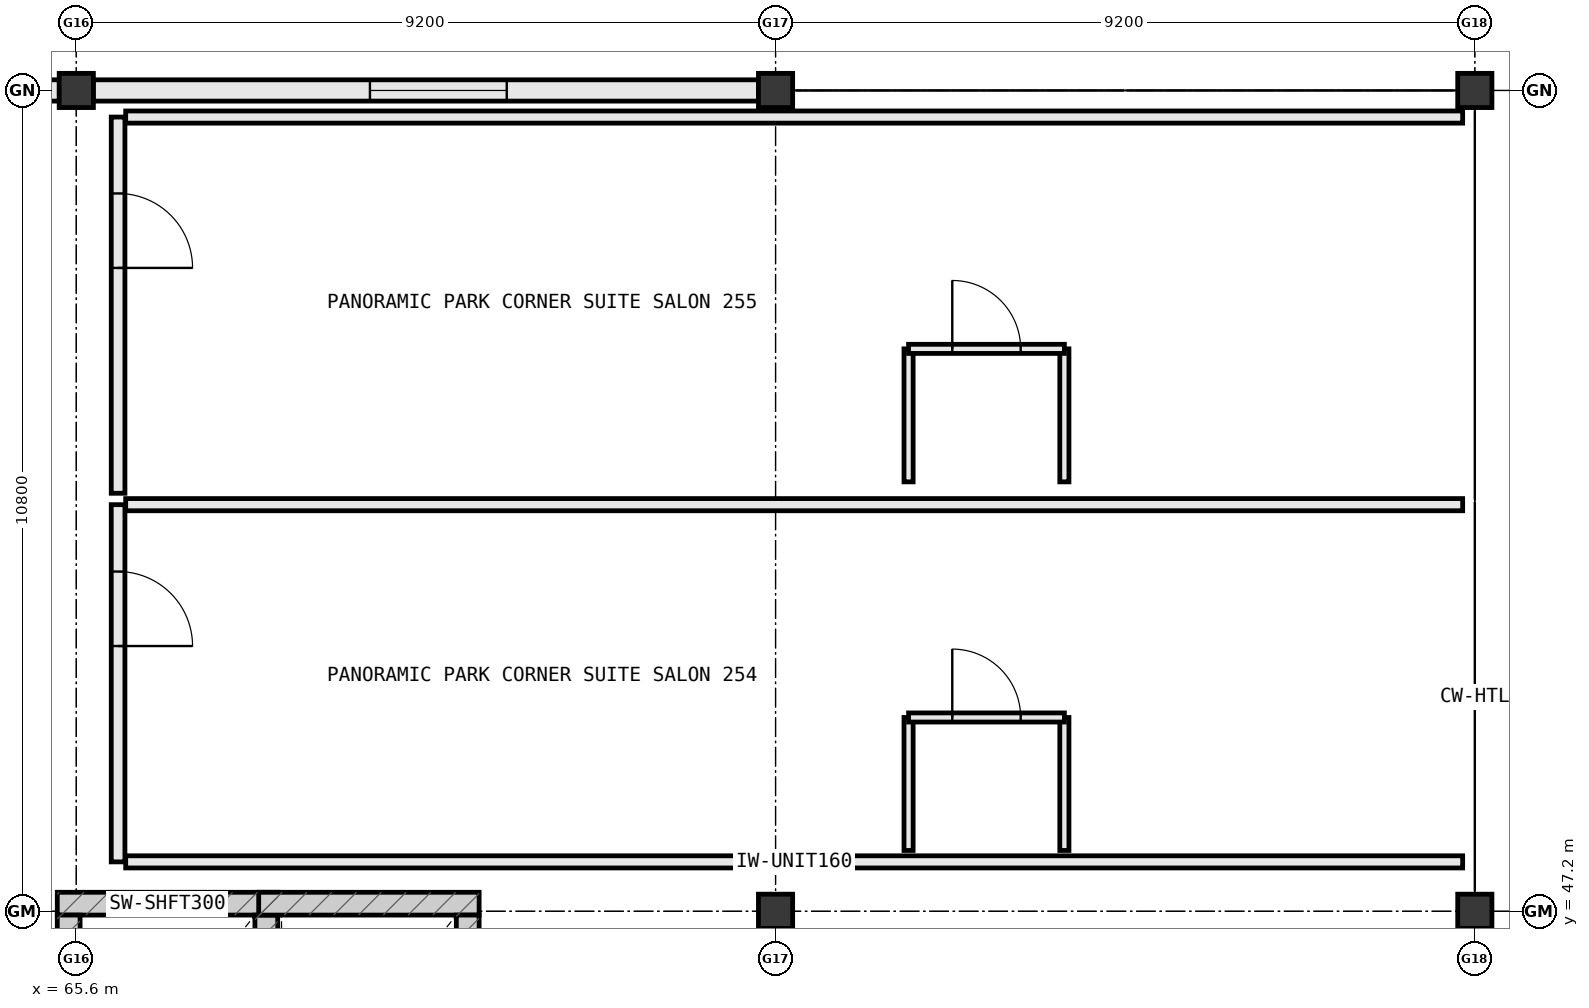
"""IFC4 building model, lengths in metres.
Left out: names, types, materials, properties, quantities, classifications, styles, units other than length and angle.
Written with IfcOpenShell. Run it as: python <this file> out.ifc"""

import sys

from ifc_helpers import new_model, si_unit, direction, frame, frame_2d, origin, origin_2d, place, context, subcontext, project, spatial, rectangle, extrude, element, fill, save


model = new_model("IFC4")
c1 = context("Model", 3, precision=1e-05, world=origin(), true_north=direction((0.0, 1.0)))
c2 = subcontext(c1, "Body", "Model", "MODEL_VIEW")
j1 = project(units=[si_unit("LENGTHUNIT", "METRE"), si_unit("PLANEANGLEUNIT", "RADIAN")], contexts=[c1])
p1 = place(None, origin())
s1 = spatial("IfcSite", under=j1, at=p1, CompositionType="ELEMENT")
p2 = place(p1, origin())
s2 = spatial("IfcBuilding", under=s1, at=p2, CompositionType="ELEMENT")
p3 = place(p2, frame((0.0, 0.0, 35.2)))
s3 = spatial("IfcBuildingStorey", under=s2, at=p3, CompositionType="ELEMENT", Elevation=35.2)
for number, where, z_axis, x_axis in (
    (1, (74.8, 47.2, 0.0), (0.0, 0.0, 1.0), (1.0, 0.0, 0.0)),
    (2, (74.8, 58.0, 0.0), (0.0, 0.0, 1.0), (1.0, 0.0, 0.0)),
    (3, (84.0, 47.2, 0.0), (0.0, 0.0, 1.0), (1.0, 0.0, 0.0)),
    (4, (84.0, 58.0, 0.0), (0.0, 0.0, 1.0), (1.0, 0.0, 0.0)),
    (5, (65.6, 58.0, 0.0), (0.0, 0.0, 1.0), (1.0, 0.0, 0.0)),
):
    element("IfcColumn", number, at=place(p3, frame(where, z_axis=z_axis, x_axis=x_axis)), inside=s3, PredefinedType="COLUMN", context=c2, shape_type="SweptSolid", body=[
        extrude(rectangle(XDim=0.45, YDim=0.45, at=origin_2d()), origin(), (0.0, 0.0, 1.0), 3.8),
    ])
p4 = place(p3, frame((74.577, 58.0, 0.0), z_axis=(0.0, 0.0, 1.0), x_axis=(-1.0, 0.0, 0.0)))
e6 = element("IfcWall", 6, at=p4, inside=s3, PredefinedType="STANDARD", context=c2, shape_type="SweptSolid", body=[
    extrude(rectangle(XDim=8.754, YDim=0.28, at=frame_2d((4.377, 0.0))), origin(), (0.0, 0.0, 1.0), 2.88),
])
p5 = place(p4, frame((3.313, 0.0, 0.85)))
e7 = element("IfcOpeningElement", 7, at=p5, cuts=e6, PredefinedType="OPENING", context=c2, shape_type="SweptSolid", body=[
    extrude(rectangle(XDim=1.8, YDim=1.85, at=frame_2d((0.9, 0.925))), frame((0.0, 0.152, 0.0), z_axis=(0.0, -1.0, 0.0), x_axis=(1.0, 0.0, 0.0)), (0.0, 0.0, 1.0), 0.304),
])
p6 = place(p3, frame((65.377, 58.0, 0.0), z_axis=(0.0, 0.0, 1.0), x_axis=(-1.0, 0.0, 0.0)))
e8 = element("IfcWall", 8, at=p6, inside=s3, PredefinedType="STANDARD", context=c2, shape_type="SweptSolid", body=[
    extrude(rectangle(XDim=4.354, YDim=0.28, at=frame_2d((2.177, 0.0))), origin(), (0.0, 0.0, 1.0), 2.88),
])
p7 = place(p6, frame((1.427, 0.0, 0.85)))
e9 = element("IfcOpeningElement", 9, at=p7, cuts=e8, PredefinedType="OPENING", context=c2, shape_type="SweptSolid", body=[
    extrude(rectangle(XDim=1.5, YDim=1.75, at=frame_2d((0.75, 0.875))), frame((0.0, 0.152, 0.0), z_axis=(0.0, -1.0, 0.0), x_axis=(1.0, 0.0, 0.0)), (0.0, 0.0, 1.0), 0.304),
])
for number, where, z_axis, x_axis in (
    (10, (68.25, 47.3, 0.0), (0.0, 0.0, 1.0), (-1.0, 0.0, 0.0)),
    (11, (68.1, 44.25, 0.0), (0.0, 0.0, 1.0), (0.0, 1.0, 0.0)),
    (12, (65.5, 47.15, 0.0), (0.0, 0.0, 1.0), (0.0, -1.0, 0.0)),
    (13, (70.9, 47.3, 0.0), (0.0, 0.0, 1.0), (-1.0, 0.0, 0.0)),
    (14, (70.75, 44.25, 0.0), (0.0, 0.0, 1.0), (0.0, 1.0, 0.0)),
):
    element("IfcWall", number, at=place(p3, frame(where, z_axis=z_axis, x_axis=x_axis)), inside=s3, PredefinedType="SHEAR", context=c2, shape_type="SweptSolid", body=[
        extrude(rectangle(XDim=2.9, YDim=0.3, at=frame_2d((1.45, 0.0))), origin(), (0.0, 0.0, 1.0), 3.8),
    ])
p8 = place(p3, frame((66.15, 52.55, 0.0), z_axis=(0.0, 0.0, 1.0), x_axis=(0.0, -1.0, 0.0)))
e15 = element("IfcWall", 15, at=p8, inside=s3, PredefinedType="PARTITIONING", context=c2, shape_type="SweptSolid", body=[
    extrude(rectangle(XDim=4.7, YDim=0.18, at=frame_2d((2.35, 0.0))), origin(), (0.0, 0.0, 1.0), 3.565),
])
p9 = place(p8, frame((0.88, 0.0, 0.0)))
e16 = element("IfcOpeningElement", 16, at=p9, cuts=e15, PredefinedType="OPENING", context=c2, shape_type="SweptSolid", body=[
    extrude(rectangle(XDim=0.98, YDim=2.18, at=frame_2d((0.49, 1.09))), frame((0.0, 0.102, 0.0), z_axis=(0.0, -1.0, 0.0), x_axis=(1.0, 0.0, 0.0)), (0.0, 0.0, 1.0), 0.204),
])
for number, where, z_axis, x_axis in (
    (17, (66.25, 47.85, 0.0), (0.0, 0.0, 1.0), (1.0, 0.0, 0.0)),
    (18, (66.25, 52.55, 0.0), (0.0, 0.0, 1.0), (1.0, 0.0, 0.0)),
):
    element("IfcWall", number, at=place(p3, frame(where, z_axis=z_axis, x_axis=x_axis)), inside=s3, PredefinedType="PARTITIONING", context=c2, shape_type="SweptSolid", body=[
        extrude(rectangle(XDim=17.59, YDim=0.16, at=frame_2d((8.795, 0.0))), origin(), (0.0, 0.0, 1.0), 3.565),
    ])
for number, where, z_axis, x_axis in (
    (19, (76.55, 48.0, 0.0), (0.0, 0.0, 1.0), (0.0, 1.0, 0.0)),
    (20, (78.6, 48.0, 0.0), (0.0, 0.0, 1.0), (0.0, 1.0, 0.0)),
):
    element("IfcWall", number, at=place(p3, frame(where, z_axis=z_axis, x_axis=x_axis)), inside=s3, PredefinedType="PARTITIONING", context=c2, shape_type="SweptSolid", body=[
        extrude(rectangle(XDim=1.75, YDim=0.12, at=frame_2d((0.875, 0.0))), origin(), (0.0, 0.0, 1.0), 3.565),
    ])
p10 = place(p3, frame((76.55, 49.75, 0.0), z_axis=(0.0, 0.0, 1.0), x_axis=(1.0, 0.0, 0.0)))
e21 = element("IfcWall", 21, at=p10, inside=s3, PredefinedType="PARTITIONING", context=c2, shape_type="SweptSolid", body=[
    extrude(rectangle(XDim=2.05, YDim=0.12, at=frame_2d((1.025, 0.0))), origin(), (0.0, 0.0, 1.0), 3.565),
])
p11 = place(p10, frame((0.575, 0.0, 0.0)))
e22 = element("IfcOpeningElement", 22, at=p11, cuts=e21, PredefinedType="OPENING", context=c2, shape_type="SweptSolid", body=[
    extrude(rectangle(XDim=0.9, YDim=2.15, at=frame_2d((0.45, 1.075))), frame((0.0, 0.072, 0.0), z_axis=(0.0, -1.0, 0.0), x_axis=(1.0, 0.0, 0.0)), (0.0, 0.0, 1.0), 0.144),
])
p12 = place(p3, frame((66.15, 57.65, 0.0), z_axis=(0.0, 0.0, 1.0), x_axis=(0.0, -1.0, 0.0)))
e23 = element("IfcWall", 23, at=p12, inside=s3, PredefinedType="PARTITIONING", context=c2, shape_type="SweptSolid", body=[
    extrude(rectangle(XDim=4.95, YDim=0.18, at=frame_2d((2.475, 0.0))), origin(), (0.0, 0.0, 1.0), 3.565),
])
p13 = place(p12, frame((1.005, 0.0, 0.0)))
e24 = element("IfcOpeningElement", 24, at=p13, cuts=e23, PredefinedType="OPENING", context=c2, shape_type="SweptSolid", body=[
    extrude(rectangle(XDim=0.98, YDim=2.18, at=frame_2d((0.49, 1.09))), frame((0.0, 0.102, 0.0), z_axis=(0.0, -1.0, 0.0), x_axis=(1.0, 0.0, 0.0)), (0.0, 0.0, 1.0), 0.204),
])
p14 = place(p3, frame((66.25, 57.65, 0.0), z_axis=(0.0, 0.0, 1.0), x_axis=(1.0, 0.0, 0.0)))
e25 = element("IfcWall", 25, at=p14, inside=s3, PredefinedType="PARTITIONING", context=c2, shape_type="SweptSolid", body=[
    extrude(rectangle(XDim=17.59, YDim=0.16, at=frame_2d((8.795, 0.0))), origin(), (0.0, 0.0, 1.0), 2.88),
])
for number, where, z_axis, x_axis in (
    (26, (76.55, 52.85, 0.0), (0.0, 0.0, 1.0), (0.0, 1.0, 0.0)),
    (27, (78.6, 52.85, 0.0), (0.0, 0.0, 1.0), (0.0, 1.0, 0.0)),
):
    element("IfcWall", number, at=place(p3, frame(where, z_axis=z_axis, x_axis=x_axis)), inside=s3, PredefinedType="PARTITIONING", context=c2, shape_type="SweptSolid", body=[
        extrude(rectangle(XDim=1.75, YDim=0.12, at=frame_2d((0.875, 0.0))), origin(), (0.0, 0.0, 1.0), 3.565),
    ])
p15 = place(p3, frame((76.55, 54.6, 0.0), z_axis=(0.0, 0.0, 1.0), x_axis=(1.0, 0.0, 0.0)))
e28 = element("IfcWall", 28, at=p15, inside=s3, PredefinedType="PARTITIONING", context=c2, shape_type="SweptSolid", body=[
    extrude(rectangle(XDim=2.05, YDim=0.12, at=frame_2d((1.025, 0.0))), origin(), (0.0, 0.0, 1.0), 3.565),
])
p16 = place(p15, frame((0.575, 0.0, 0.0)))
e29 = element("IfcOpeningElement", 29, at=p16, cuts=e28, PredefinedType="OPENING", context=c2, shape_type="SweptSolid", body=[
    extrude(rectangle(XDim=0.9, YDim=2.15, at=frame_2d((0.45, 1.075))), frame((0.0, 0.072, 0.0), z_axis=(0.0, -1.0, 0.0), x_axis=(1.0, 0.0, 0.0)), (0.0, 0.0, 1.0), 0.144),
])
p17 = place(p5, origin())
e30 = element("IfcWindow", 30, at=p17, inside=s3, PartitioningType="SINGLE_PANEL", PredefinedType="WINDOW", context=c2, shape_type="SweptSolid", body=[
    extrude(rectangle(XDim=1.8, YDim=1.85, at=frame_2d((0.9, 0.925))), frame((0.0, 0.03, 0.0), z_axis=(0.0, -1.0, 0.0), x_axis=(1.0, 0.0, 0.0)), (0.0, 0.0, 1.0), 0.06),
])
fill(e7, e30)
p18 = place(p9, origin())
e31 = element("IfcDoor", 31, at=p18, inside=s3, OperationType="SINGLE_SWING_RIGHT", PredefinedType="DOOR", context=c2, shape_type="SweptSolid", body=[
    extrude(rectangle(XDim=0.98, YDim=2.18, at=frame_2d((0.49, 1.09))), frame((0.0, 0.025, 0.0), z_axis=(0.0, -1.0, 0.0), x_axis=(1.0, 0.0, 0.0)), (0.0, 0.0, 1.0), 0.05),
])
fill(e16, e31)
p19 = place(p11, origin())
e32 = element("IfcDoor", 32, at=p19, inside=s3, OperationType="SINGLE_SWING_LEFT", PredefinedType="DOOR", context=c2, shape_type="SweptSolid", body=[
    extrude(rectangle(XDim=0.9, YDim=2.15, at=frame_2d((0.45, 1.075))), frame((0.0, 0.025, 0.0), z_axis=(0.0, -1.0, 0.0), x_axis=(1.0, 0.0, 0.0)), (0.0, 0.0, 1.0), 0.05),
])
fill(e22, e32)
p20 = place(p13, origin())
e33 = element("IfcDoor", 33, at=p20, inside=s3, OperationType="SINGLE_SWING_RIGHT", PredefinedType="DOOR", context=c2, shape_type="SweptSolid", body=[
    extrude(rectangle(XDim=0.98, YDim=2.18, at=frame_2d((0.49, 1.09))), frame((0.0, 0.025, 0.0), z_axis=(0.0, -1.0, 0.0), x_axis=(1.0, 0.0, 0.0)), (0.0, 0.0, 1.0), 0.05),
])
fill(e24, e33)
p21 = place(p16, origin())
e34 = element("IfcDoor", 34, at=p21, inside=s3, OperationType="SINGLE_SWING_LEFT", PredefinedType="DOOR", context=c2, shape_type="SweptSolid", body=[
    extrude(rectangle(XDim=0.9, YDim=2.15, at=frame_2d((0.45, 1.075))), frame((0.0, 0.025, 0.0), z_axis=(0.0, -1.0, 0.0), x_axis=(1.0, 0.0, 0.0)), (0.0, 0.0, 1.0), 0.05),
])
fill(e29, e34)
save(model, sys.argv[1])
